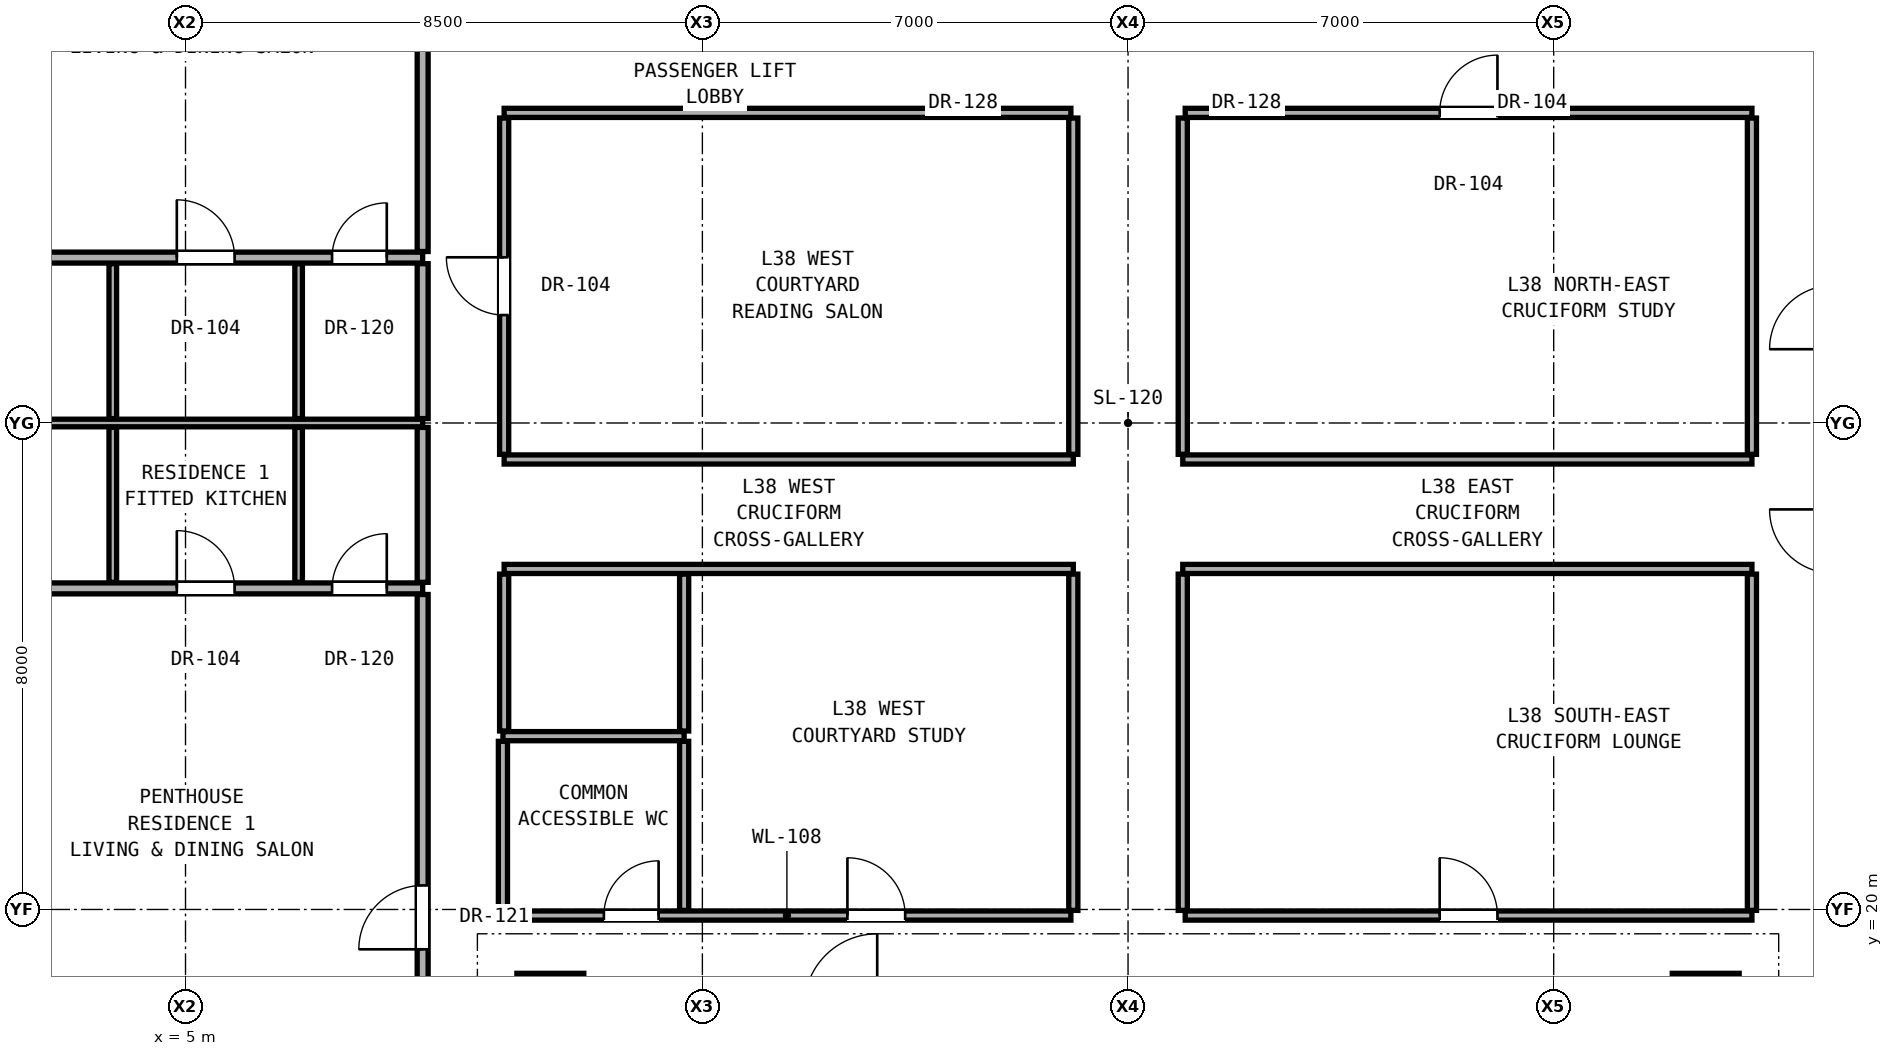
"""IFC4 building model, lengths in metres.
Left out: names, types, materials, properties, quantities, classifications, styles, units other than length and angle.
Written with IfcOpenShell. Run it as: python <this file> out.ifc"""

import sys

from ifc_helpers import new_model, si_unit, direction, frame, frame_2d, origin, origin_2d, place, context, subcontext, project, spatial, rectangle, extrude, element, fill, save


model = new_model("IFC4")
c1 = context("Model", 3, precision=1e-05, world=origin(), true_north=direction((0.0, 1.0)))
c2 = subcontext(c1, "Body", "Model", "MODEL_VIEW")
j1 = project(units=[si_unit("LENGTHUNIT", "METRE"), si_unit("PLANEANGLEUNIT", "RADIAN")], contexts=[c1])
p1 = place(None, origin())
s1 = spatial("IfcSite", under=j1, at=p1, CompositionType="ELEMENT")
p2 = place(p1, origin())
s2 = spatial("IfcBuilding", under=s1, at=p2, CompositionType="ELEMENT")
p3 = place(p2, frame((0.0, 0.0, 134.6)))
s3 = spatial("IfcBuildingStorey", under=s2, at=p3, CompositionType="ELEMENT", Elevation=134.6)
for number, where, z_axis, x_axis in (
    (1, (11.0, 18.4, 0.0), (0.0, 0.0, 1.0), (1.0, 0.0, 0.0)),
    (2, (30.0, 18.4, 0.0), (0.0, 0.0, 1.0), (1.0, 0.0, 0.0)),
):
    element("IfcColumn", number, at=place(p3, frame(where, z_axis=z_axis, x_axis=x_axis)), inside=s3, PredefinedType="COLUMN", context=c2, shape_type="SweptSolid", body=[
        extrude(rectangle(XDim=1.1, YDim=1.1, at=origin_2d()), origin(), (0.0, 0.0, 1.0), 3.3),
    ])
p4 = place(p3, frame((10.22, 19.9, 0.0), z_axis=(0.0, 0.0, 1.0), x_axis=(1.0, 0.0, 0.0)))
e3 = element("IfcWall", 3, at=p4, inside=s3, PredefinedType="PARTITIONING", context=c2, shape_type="SweptSolid", body=[
    extrude(rectangle(XDim=9.34, YDim=0.15, at=frame_2d((4.67, 0.0))), origin(), (0.0, 0.0, 1.0), 2.216),
])
p5 = place(p4, frame((1.66, 0.0, 0.0)))
e4 = element("IfcOpeningElement", 4, at=p5, cuts=e3, PredefinedType="OPENING", context=c2, shape_type="SweptSolid", body=[
    extrude(rectangle(XDim=0.9, YDim=2.1, at=frame_2d((0.45, 1.05))), frame((0.0, 0.085, 0.0), z_axis=(0.0, -1.0, 0.0), x_axis=(1.0, 0.0, 0.0)), (0.0, 0.0, 1.0), 0.17),
])
p6 = place(p4, frame((5.665, 0.0, 0.0)))
e5 = element("IfcOpeningElement", 5, at=p6, cuts=e3, PredefinedType="OPENING", context=c2, shape_type="SweptSolid", body=[
    extrude(rectangle(XDim=0.95, YDim=2.15, at=frame_2d((0.475, 1.075))), frame((0.0, 0.085, 0.0), z_axis=(0.0, -1.0, 0.0), x_axis=(1.0, 0.0, 0.0)), (0.0, 0.0, 1.0), 0.17),
])
p7 = place(p3, frame((21.44, 19.9, 0.0), z_axis=(0.0, 0.0, 1.0), x_axis=(1.0, 0.0, 0.0)))
e6 = element("IfcWall", 6, at=p7, inside=s3, PredefinedType="PARTITIONING", context=c2, shape_type="SweptSolid", body=[
    extrude(rectangle(XDim=9.32, YDim=0.15, at=frame_2d((4.66, 0.0))), origin(), (0.0, 0.0, 1.0), 2.216),
])
p8 = place(p7, frame((4.185, 0.0, 0.0)))
e7 = element("IfcOpeningElement", 7, at=p8, cuts=e6, PredefinedType="OPENING", context=c2, shape_type="SweptSolid", body=[
    extrude(rectangle(XDim=0.95, YDim=2.15, at=frame_2d((0.475, 1.075))), frame((0.0, 0.085, 0.0), z_axis=(0.0, -1.0, 0.0), x_axis=(1.0, 0.0, 0.0)), (0.0, 0.0, 1.0), 0.17),
])
p9 = place(p3, frame((10.22, 22.85, 0.0), z_axis=(0.0, 0.0, 1.0), x_axis=(1.0, 0.0, 0.0)))
e8 = element("IfcWall", 8, at=p9, inside=s3, PredefinedType="PARTITIONING", context=c2, shape_type="SweptSolid", body=[
    extrude(rectangle(XDim=2.98, YDim=0.15, at=frame_2d((1.49, 0.0))), origin(), (0.0, 0.0, 1.0), 2.216),
])
p10 = place(p3, frame((-0.78, 25.28, 0.0), z_axis=(0.0, 0.0, 1.0), x_axis=(1.0, 0.0, 0.0)))
e9 = element("IfcWall", 9, at=p10, inside=s3, PredefinedType="PARTITIONING", context=c2, shape_type="SweptSolid", body=[
    extrude(rectangle(XDim=9.68, YDim=0.18, at=frame_2d((4.84, 0.0))), origin(), (0.0, 0.0, 1.0), 2.299),
])
p11 = place(p10, frame((1.237, 0.0, 0.0)))
e10 = element("IfcOpeningElement", 10, at=p11, cuts=e9, PredefinedType="OPENING", context=c2, shape_type="SweptSolid", body=[
    extrude(rectangle(XDim=0.95, YDim=2.15, at=frame_2d((0.475, 1.075))), frame((0.0, 0.1, 0.0), z_axis=(0.0, -1.0, 0.0), x_axis=(1.0, 0.0, 0.0)), (0.0, 0.0, 1.0), 0.2),
])
p12 = place(p10, frame((5.637, 0.0, 0.0)))
e11 = element("IfcOpeningElement", 11, at=p12, cuts=e9, PredefinedType="OPENING", context=c2, shape_type="SweptSolid", body=[
    extrude(rectangle(XDim=0.95, YDim=2.15, at=frame_2d((0.475, 1.075))), frame((0.0, 0.1, 0.0), z_axis=(0.0, -1.0, 0.0), x_axis=(1.0, 0.0, 0.0)), (0.0, 0.0, 1.0), 0.2),
])
p13 = place(p10, frame((8.19, 0.0, 0.0)))
e12 = element("IfcOpeningElement", 12, at=p13, cuts=e9, PredefinedType="OPENING", context=c2, shape_type="SweptSolid", body=[
    extrude(rectangle(XDim=0.9, YDim=2.1, at=frame_2d((0.45, 1.05))), frame((0.0, 0.1, 0.0), z_axis=(0.0, -1.0, 0.0), x_axis=(1.0, 0.0, 0.0)), (0.0, 0.0, 1.0), 0.2),
])
for number, where, z_axis, x_axis in (
    (13, (10.24, 25.6, 0.0), (0.0, 0.0, 1.0), (1.0, 0.0, 0.0)),
    (14, (21.4, 25.6, 0.0), (0.0, 0.0, 1.0), (1.0, 0.0, 0.0)),
    (15, (10.24, 27.4, 0.0), (0.0, 0.0, 1.0), (1.0, 0.0, 0.0)),
    (16, (21.4, 27.4, 0.0), (0.0, 0.0, 1.0), (1.0, 0.0, 0.0)),
):
    element("IfcWall", number, at=place(p3, frame(where, z_axis=z_axis, x_axis=x_axis)), inside=s3, PredefinedType="PARTITIONING", context=c2, shape_type="SweptSolid", body=[
        extrude(rectangle(XDim=9.36, YDim=0.15, at=frame_2d((4.68, 0.0))), origin(), (0.0, 0.0, 1.0), 2.216),
    ])
p14 = place(p3, frame((-0.78, 28.0, 0.0), z_axis=(0.0, 0.0, 1.0), x_axis=(1.0, 0.0, 0.0)))
e17 = element("IfcWall", 17, at=p14, inside=s3, PredefinedType="PARTITIONING", context=c2, shape_type="SweptSolid", body=[
    extrude(rectangle(XDim=9.68, YDim=0.125, at=frame_2d((4.84, 0.0))), origin(), (0.0, 0.0, 1.0), 2.299),
])
p15 = place(p3, frame((-0.78, 30.72, 0.0), z_axis=(0.0, 0.0, 1.0), x_axis=(1.0, 0.0, 0.0)))
e18 = element("IfcWall", 18, at=p15, inside=s3, PredefinedType="PARTITIONING", context=c2, shape_type="SweptSolid", body=[
    extrude(rectangle(XDim=9.68, YDim=0.18, at=frame_2d((4.84, 0.0))), origin(), (0.0, 0.0, 1.0), 2.299),
])
p16 = place(p15, frame((1.237, 0.0, 0.0)))
e19 = element("IfcOpeningElement", 19, at=p16, cuts=e18, PredefinedType="OPENING", context=c2, shape_type="SweptSolid", body=[
    extrude(rectangle(XDim=0.95, YDim=2.15, at=frame_2d((0.475, 1.075))), frame((0.0, 0.1, 0.0), z_axis=(0.0, -1.0, 0.0), x_axis=(1.0, 0.0, 0.0)), (0.0, 0.0, 1.0), 0.2),
])
p17 = place(p15, frame((5.637, 0.0, 0.0)))
e20 = element("IfcOpeningElement", 20, at=p17, cuts=e18, PredefinedType="OPENING", context=c2, shape_type="SweptSolid", body=[
    extrude(rectangle(XDim=0.95, YDim=2.15, at=frame_2d((0.475, 1.075))), frame((0.0, 0.1, 0.0), z_axis=(0.0, -1.0, 0.0), x_axis=(1.0, 0.0, 0.0)), (0.0, 0.0, 1.0), 0.2),
])
p18 = place(p15, frame((8.19, 0.0, 0.0)))
e21 = element("IfcOpeningElement", 21, at=p18, cuts=e18, PredefinedType="OPENING", context=c2, shape_type="SweptSolid", body=[
    extrude(rectangle(XDim=0.9, YDim=2.1, at=frame_2d((0.45, 1.05))), frame((0.0, 0.1, 0.0), z_axis=(0.0, -1.0, 0.0), x_axis=(1.0, 0.0, 0.0)), (0.0, 0.0, 1.0), 0.2),
])
p19 = place(p3, frame((10.24, 33.1, 0.0), z_axis=(0.0, 0.0, 1.0), x_axis=(1.0, 0.0, 0.0)))
e22 = element("IfcWall", 22, at=p19, inside=s3, PredefinedType="PARTITIONING", context=c2, shape_type="SweptSolid", body=[
    extrude(rectangle(XDim=9.32, YDim=0.15, at=frame_2d((4.66, 0.0))), origin(), (0.0, 0.0, 1.0), 2.216),
])
p20 = place(p3, frame((21.44, 33.1, 0.0), z_axis=(0.0, 0.0, 1.0), x_axis=(1.0, 0.0, 0.0)))
e23 = element("IfcWall", 23, at=p20, inside=s3, PredefinedType="PARTITIONING", context=c2, shape_type="SweptSolid", body=[
    extrude(rectangle(XDim=9.32, YDim=0.15, at=frame_2d((4.66, 0.0))), origin(), (0.0, 0.0, 1.0), 2.216),
])
p21 = place(p20, frame((4.185, 0.0, 0.0)))
e24 = element("IfcOpeningElement", 24, at=p21, cuts=e23, PredefinedType="OPENING", context=c2, shape_type="SweptSolid", body=[
    extrude(rectangle(XDim=0.95, YDim=2.15, at=frame_2d((0.475, 1.075))), frame((0.0, 0.085, 0.0), z_axis=(0.0, -1.0, 0.0), x_axis=(1.0, 0.0, 0.0)), (0.0, 0.0, 1.0), 0.17),
])
for number, where, z_axis, x_axis in (
    (25, (3.804, 25.38, 0.0), (0.0, 0.0, 1.0), (0.0, 1.0, 0.0)),
    (26, (3.804, 28.073, 0.0), (0.0, 0.0, 1.0), (0.0, 1.0, 0.0)),
    (27, (6.86, 25.38, 0.0), (0.0, 0.0, 1.0), (0.0, 1.0, 0.0)),
    (28, (6.86, 28.073, 0.0), (0.0, 0.0, 1.0), (0.0, 1.0, 0.0)),
):
    element("IfcWall", number, at=place(p3, frame(where, z_axis=z_axis, x_axis=x_axis)), inside=s3, PredefinedType="PARTITIONING", context=c2, shape_type="SweptSolid", body=[
        extrude(rectangle(XDim=2.548, YDim=0.125, at=frame_2d((1.274, 0.0))), origin(), (0.0, 0.0, 1.0), 3.08),
    ])
p22 = place(p3, frame((8.9, 14.56, 0.0), z_axis=(0.0, 0.0, 1.0), x_axis=(0.0, 1.0, 0.0)))
e29 = element("IfcWall", 29, at=p22, inside=s3, PredefinedType="PARTITIONING", context=c2, shape_type="SweptSolid", body=[
    extrude(rectangle(XDim=10.62, YDim=0.18, at=frame_2d((5.31, 0.0))), origin(), (0.0, 0.0, 1.0), 2.299),
])
p23 = place(p22, frame((4.785, 0.0, 0.0)))
e30 = element("IfcOpeningElement", 30, at=p23, cuts=e29, PredefinedType="OPENING", context=c2, shape_type="SweptSolid", body=[
    extrude(rectangle(XDim=1.05, YDim=2.2, at=frame_2d((0.525, 1.1))), frame((0.0, 0.1, 0.0), z_axis=(0.0, -1.0, 0.0), x_axis=(1.0, 0.0, 0.0)), (0.0, 0.0, 1.0), 0.2),
])
for number, where, z_axis, x_axis in (
    (31, (8.9, 25.38, 0.0), (0.0, 0.0, 1.0), (0.0, 1.0, 0.0)),
    (32, (8.9, 28.073, 0.0), (0.0, 0.0, 1.0), (0.0, 1.0, 0.0)),
):
    element("IfcWall", number, at=place(p3, frame(where, z_axis=z_axis, x_axis=x_axis)), inside=s3, PredefinedType="PARTITIONING", context=c2, shape_type="SweptSolid", body=[
        extrude(rectangle(XDim=2.548, YDim=0.18, at=frame_2d((1.274, 0.0))), origin(), (0.0, 0.0, 1.0), 3.08),
    ])
p24 = place(p3, frame((8.9, 30.82, 0.0), z_axis=(0.0, 0.0, 1.0), x_axis=(0.0, 1.0, 0.0)))
e33 = element("IfcWall", 33, at=p24, inside=s3, PredefinedType="PARTITIONING", context=c2, shape_type="SweptSolid", body=[
    extrude(rectangle(XDim=10.62, YDim=0.18, at=frame_2d((5.31, 0.0))), origin(), (0.0, 0.0, 1.0), 2.299),
])
p25 = place(p24, frame((4.785, 0.0, 0.0)))
e34 = element("IfcOpeningElement", 34, at=p25, cuts=e33, PredefinedType="OPENING", context=c2, shape_type="SweptSolid", body=[
    extrude(rectangle(XDim=1.05, YDim=2.2, at=frame_2d((0.525, 1.1))), frame((0.0, 0.1, 0.0), z_axis=(0.0, -1.0, 0.0), x_axis=(1.0, 0.0, 0.0)), (0.0, 0.0, 1.0), 0.2),
])
p26 = place(p3, frame((10.22, 19.985, 0.0), z_axis=(0.0, 0.0, 1.0), x_axis=(0.0, 1.0, 0.0)))
e35 = element("IfcWall", 35, at=p26, inside=s3, PredefinedType="PARTITIONING", context=c2, shape_type="SweptSolid", body=[
    extrude(rectangle(XDim=2.78, YDim=0.15, at=frame_2d((1.39, 0.0))), origin(), (0.0, 0.0, 1.0), 3.08),
])
p27 = place(p3, frame((10.24, 22.935, 0.0), z_axis=(0.0, 0.0, 1.0), x_axis=(0.0, 1.0, 0.0)))
e36 = element("IfcWall", 36, at=p27, inside=s3, PredefinedType="PARTITIONING", context=c2, shape_type="SweptSolid", body=[
    extrude(rectangle(XDim=2.58, YDim=0.15, at=frame_2d((1.29, 0.0))), origin(), (0.0, 0.0, 1.0), 2.299),
])
p28 = place(p3, frame((10.24, 27.485, 0.0), z_axis=(0.0, 0.0, 1.0), x_axis=(0.0, 1.0, 0.0)))
e37 = element("IfcWall", 37, at=p28, inside=s3, PredefinedType="PARTITIONING", context=c2, shape_type="SweptSolid", body=[
    extrude(rectangle(XDim=5.53, YDim=0.15, at=frame_2d((2.765, 0.0))), origin(), (0.0, 0.0, 1.0), 2.299),
])
p29 = place(p28, frame((2.29, 0.0, 0.0)))
e38 = element("IfcOpeningElement", 38, at=p29, cuts=e37, PredefinedType="OPENING", context=c2, shape_type="SweptSolid", body=[
    extrude(rectangle(XDim=0.95, YDim=2.15, at=frame_2d((0.475, 1.075))), frame((0.0, 0.085, 0.0), z_axis=(0.0, -1.0, 0.0), x_axis=(1.0, 0.0, 0.0)), (0.0, 0.0, 1.0), 0.17),
])
p30 = place(p3, frame((13.2, 19.985, 0.0), z_axis=(0.0, 0.0, 1.0), x_axis=(0.0, 1.0, 0.0)))
e39 = element("IfcWall", 39, at=p30, inside=s3, PredefinedType="PARTITIONING", context=c2, shape_type="SweptSolid", body=[
    extrude(rectangle(XDim=2.78, YDim=0.15, at=frame_2d((1.39, 0.0))), origin(), (0.0, 0.0, 1.0), 3.08),
])
p31 = place(p3, frame((13.2, 22.935, 0.0), z_axis=(0.0, 0.0, 1.0), x_axis=(0.0, 1.0, 0.0)))
e40 = element("IfcWall", 40, at=p31, inside=s3, PredefinedType="PARTITIONING", context=c2, shape_type="SweptSolid", body=[
    extrude(rectangle(XDim=2.58, YDim=0.15, at=frame_2d((1.29, 0.0))), origin(), (0.0, 0.0, 1.0), 2.216),
])
for number, where, z_axis, x_axis in (
    (41, (19.6, 19.985, 0.0), (0.0, 0.0, 1.0), (0.0, 1.0, 0.0)),
    (42, (19.6, 27.485, 0.0), (0.0, 0.0, 1.0), (0.0, 1.0, 0.0)),
    (43, (21.4, 19.985, 0.0), (0.0, 0.0, 1.0), (0.0, 1.0, 0.0)),
    (44, (21.4, 27.485, 0.0), (0.0, 0.0, 1.0), (0.0, 1.0, 0.0)),
):
    element("IfcWall", number, at=place(p3, frame(where, z_axis=z_axis, x_axis=x_axis)), inside=s3, PredefinedType="PARTITIONING", context=c2, shape_type="SweptSolid", body=[
        extrude(rectangle(XDim=5.53, YDim=0.15, at=frame_2d((2.765, 0.0))), origin(), (0.0, 0.0, 1.0), 2.216),
    ])
for number, where, z_axis, x_axis in (
    (45, (30.76, 19.985, 0.0), (0.0, 0.0, 1.0), (0.0, 1.0, 0.0)),
    (46, (30.76, 27.485, 0.0), (0.0, 0.0, 1.0), (0.0, 1.0, 0.0)),
):
    element("IfcWall", number, at=place(p3, frame(where, z_axis=z_axis, x_axis=x_axis)), inside=s3, PredefinedType="PARTITIONING", context=c2, shape_type="SweptSolid", body=[
        extrude(rectangle(XDim=5.53, YDim=0.15, at=frame_2d((2.765, 0.0))), origin(), (0.0, 0.0, 1.0), 2.299),
    ])
p32 = place(p5, origin())
e47 = element("IfcDoor", 47, at=p32, inside=s3, OperationType="SINGLE_SWING_RIGHT", PredefinedType="DOOR", context=c2, shape_type="SweptSolid", body=[
    extrude(rectangle(XDim=0.9, YDim=2.1, at=frame_2d((0.45, 1.05))), frame((0.0, 0.025, 0.0), z_axis=(0.0, -1.0, 0.0), x_axis=(1.0, 0.0, 0.0)), (0.0, 0.0, 1.0), 0.05),
])
fill(e4, e47)
p33 = place(p23, origin())
e48 = element("IfcDoor", 48, at=p33, inside=s3, OperationType="SINGLE_SWING_LEFT", PredefinedType="DOOR", context=c2, shape_type="SweptSolid", body=[
    extrude(rectangle(XDim=1.05, YDim=2.2, at=frame_2d((0.525, 1.1))), frame((0.0, 0.025, 0.0), z_axis=(0.0, -1.0, 0.0), x_axis=(1.0, 0.0, 0.0)), (0.0, 0.0, 1.0), 0.05),
])
fill(e30, e48)
p34 = place(p12, origin())
e49 = element("IfcDoor", 49, at=p34, inside=s3, OperationType="SINGLE_SWING_LEFT", PredefinedType="DOOR", context=c2, shape_type="SweptSolid", body=[
    extrude(rectangle(XDim=0.95, YDim=2.15, at=frame_2d((0.475, 1.075))), frame((0.0, 0.025, 0.0), z_axis=(0.0, -1.0, 0.0), x_axis=(1.0, 0.0, 0.0)), (0.0, 0.0, 1.0), 0.05),
])
fill(e11, e49)
p35 = place(p13, origin())
e50 = element("IfcDoor", 50, at=p35, inside=s3, OperationType="SINGLE_SWING_RIGHT", PredefinedType="DOOR", context=c2, shape_type="SweptSolid", body=[
    extrude(rectangle(XDim=0.9, YDim=2.1, at=frame_2d((0.45, 1.05))), frame((0.0, 0.025, 0.0), z_axis=(0.0, -1.0, 0.0), x_axis=(1.0, 0.0, 0.0)), (0.0, 0.0, 1.0), 0.05),
])
fill(e12, e50)
p36 = place(p17, origin())
e51 = element("IfcDoor", 51, at=p36, inside=s3, OperationType="SINGLE_SWING_LEFT", PredefinedType="DOOR", context=c2, shape_type="SweptSolid", body=[
    extrude(rectangle(XDim=0.95, YDim=2.15, at=frame_2d((0.475, 1.075))), frame((0.0, 0.025, 0.0), z_axis=(0.0, -1.0, 0.0), x_axis=(1.0, 0.0, 0.0)), (0.0, 0.0, 1.0), 0.05),
])
fill(e20, e51)
p37 = place(p18, origin())
e52 = element("IfcDoor", 52, at=p37, inside=s3, OperationType="SINGLE_SWING_RIGHT", PredefinedType="DOOR", context=c2, shape_type="SweptSolid", body=[
    extrude(rectangle(XDim=0.9, YDim=2.1, at=frame_2d((0.45, 1.05))), frame((0.0, 0.025, 0.0), z_axis=(0.0, -1.0, 0.0), x_axis=(1.0, 0.0, 0.0)), (0.0, 0.0, 1.0), 0.05),
])
fill(e21, e52)
p38 = place(p6, origin())
e53 = element("IfcDoor", 53, at=p38, inside=s3, OperationType="SINGLE_SWING_LEFT", PredefinedType="DOOR", context=c2, shape_type="SweptSolid", body=[
    extrude(rectangle(XDim=0.95, YDim=2.15, at=frame_2d((0.475, 1.075))), frame((0.0, 0.025, 0.0), z_axis=(0.0, -1.0, 0.0), x_axis=(1.0, 0.0, 0.0)), (0.0, 0.0, 1.0), 0.05),
])
fill(e5, e53)
p39 = place(p29, origin())
e54 = element("IfcDoor", 54, at=p39, inside=s3, OperationType="SINGLE_SWING_RIGHT", PredefinedType="DOOR", context=c2, shape_type="SweptSolid", body=[
    extrude(rectangle(XDim=0.95, YDim=2.15, at=frame_2d((0.475, 1.075))), frame((0.0, 0.025, 0.0), z_axis=(0.0, -1.0, 0.0), x_axis=(1.0, 0.0, 0.0)), (0.0, 0.0, 1.0), 0.05),
])
fill(e38, e54)
p40 = place(p8, origin())
e55 = element("IfcDoor", 55, at=p40, inside=s3, OperationType="SINGLE_SWING_LEFT", PredefinedType="DOOR", context=c2, shape_type="SweptSolid", body=[
    extrude(rectangle(XDim=0.95, YDim=2.15, at=frame_2d((0.475, 1.075))), frame((0.0, 0.025, 0.0), z_axis=(0.0, -1.0, 0.0), x_axis=(1.0, 0.0, 0.0)), (0.0, 0.0, 1.0), 0.05),
])
fill(e7, e55)
p41 = place(p21, origin())
e56 = element("IfcDoor", 56, at=p41, inside=s3, OperationType="SINGLE_SWING_RIGHT", PredefinedType="DOOR", context=c2, shape_type="SweptSolid", body=[
    extrude(rectangle(XDim=0.95, YDim=2.15, at=frame_2d((0.475, 1.075))), frame((0.0, 0.025, 0.0), z_axis=(0.0, -1.0, 0.0), x_axis=(1.0, 0.0, 0.0)), (0.0, 0.0, 1.0), 0.05),
])
fill(e24, e56)
save(model, sys.argv[1])
